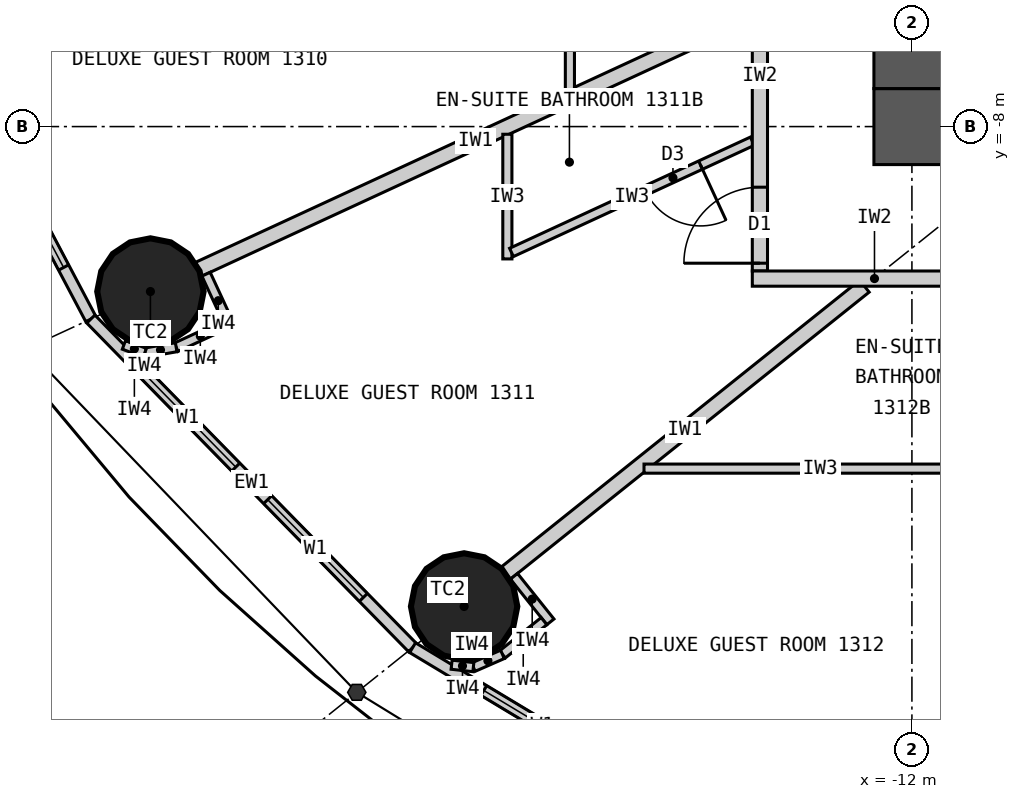
"""IFC4 building model, lengths in metres.
Left out: names, types, materials, properties, quantities, classifications, styles, units other than length and angle.
Written with IfcOpenShell. Run it as: python <this file> out.ifc"""

import sys

from ifc_helpers import new_model, si_unit, direction, frame, frame_2d, origin, origin_2d, place, context, subcontext, project, spatial, rectangle, circle, extrude, element, fill, save


model = new_model("IFC4")
c1 = context("Model", 3, precision=1e-05, world=origin(), true_north=direction((0.0, 1.0)))
c2 = subcontext(c1, "Body", "Model", "MODEL_VIEW")
j1 = project(units=[si_unit("LENGTHUNIT", "METRE"), si_unit("PLANEANGLEUNIT", "RADIAN")], contexts=[c1])
p1 = place(None, origin())
s1 = spatial("IfcSite", under=j1, at=p1, CompositionType="ELEMENT")
p2 = place(p1, origin())
s2 = spatial("IfcBuilding", under=s1, at=p2, CompositionType="ELEMENT")
p3 = place(p2, frame((0.0, 0.0, 57.3)))
s3 = spatial("IfcBuildingStorey", under=s2, at=p3, CompositionType="ELEMENT", Elevation=57.3)
for number, where, z_axis, x_axis in (
    (1, (-22.019, -10.17, 0.0), (0.0, 0.0, 1.0), (1.0, 0.0, 0.0)),
    (2, (-17.892, -14.313, 0.0), (0.0, 0.0, 1.0), (1.0, 0.0, 0.0)),
):
    element("IfcColumn", number, at=place(p3, frame(where, z_axis=z_axis, x_axis=x_axis)), inside=s3, PredefinedType="COLUMN", context=c2, shape_type="SweptSolid", body=[
        extrude(circle(Radius=0.7, at=origin_2d()), origin(), (0.0, 0.0, 1.0), 3.3),
    ])
p4 = place(p3, frame((12.5, -8.0, 0.0), z_axis=(0.0, 0.0, 1.0), x_axis=(-1.0, 0.0, 0.0)))
e3 = element("IfcWall", 3, at=p4, inside=s3, PredefinedType="SHEAR", context=c2, shape_type="SweptSolid", body=[
    extrude(rectangle(XDim=25.0, YDim=1.0, at=frame_2d((12.5, 0.0))), origin(), (0.0, 0.0, 1.0), 3.3),
])
p5 = place(p4, frame((11.2, 0.0, 0.0)))
e4 = element("IfcOpeningElement", 4, at=p5, cuts=e3, PredefinedType="OPENING", context=c2, shape_type="SweptSolid", body=[
    extrude(rectangle(XDim=1.2, YDim=2.2, at=frame_2d((0.6, 1.1))), frame((0.0, 0.51, 0.0), z_axis=(0.0, -1.0, 0.0), x_axis=(1.0, 0.0, 0.0)), (0.0, 0.0, 1.0), 1.02),
])
p6 = place(p4, frame((18.8, 0.0, 0.0)))
e5 = element("IfcOpeningElement", 5, at=p6, cuts=e3, PredefinedType="OPENING", context=c2, shape_type="SweptSolid", body=[
    extrude(rectangle(XDim=0.9, YDim=2.2, at=frame_2d((0.45, 1.1))), frame((0.0, 0.51, 0.0), z_axis=(0.0, -1.0, 0.0), x_axis=(1.0, 0.0, 0.0)), (0.0, 0.0, 1.0), 1.02),
])
p7 = place(p3, frame((-12.0, 7.5, 0.0), z_axis=(0.0, 0.0, 1.0), x_axis=(0.0, -1.0, 0.0)))
e6 = element("IfcWall", 6, at=p7, inside=s3, PredefinedType="SHEAR", context=c2, shape_type="SweptSolid", body=[
    extrude(rectangle(XDim=15.0, YDim=1.0, at=frame_2d((7.5, 0.0))), origin(), (0.0, 0.0, 1.0), 3.3),
])
p8 = place(p7, frame((6.6, 0.0, 0.0)))
e7 = element("IfcOpeningElement", 7, at=p8, cuts=e6, PredefinedType="OPENING", context=c2, shape_type="SweptSolid", body=[
    extrude(rectangle(XDim=1.8, YDim=2.2, at=frame_2d((0.9, 1.1))), frame((0.0, 0.51, 0.0), z_axis=(0.0, -1.0, 0.0), x_axis=(1.0, 0.0, 0.0)), (0.0, 0.0, 1.0), 1.02),
])
p9 = place(p3, frame((-25.482, -5.462, 0.0), z_axis=(0.0, 0.0, 1.0), x_axis=(0.467296867008, -0.884100468321, 0.0)))
e8 = element("IfcWall", 8, at=p9, inside=s3, PredefinedType="ELEMENTEDWALL", context=c2, shape_type="SweptSolid", body=[
    extrude(rectangle(XDim=5.734, YDim=0.15, at=frame_2d((2.867, 0.0))), origin(), (0.0, 0.0, 1.0), 3.12),
])
p10 = place(p9, frame((0.767, 0.0, 0.9)))
e9 = element("IfcOpeningElement", 9, at=p10, cuts=e8, PredefinedType="OPENING", context=c2, shape_type="SweptSolid", body=[
    extrude(rectangle(XDim=1.8, YDim=1.9, at=frame_2d((0.9, 0.95))), frame((0.0, 0.085, 0.0), z_axis=(0.0, -1.0, 0.0), x_axis=(1.0, 0.0, 0.0)), (0.0, 0.0, 1.0), 0.17),
])
p11 = place(p9, frame((3.167, 0.0, 0.9)))
e10 = element("IfcOpeningElement", 10, at=p11, cuts=e8, PredefinedType="OPENING", context=c2, shape_type="SweptSolid", body=[
    extrude(rectangle(XDim=1.8, YDim=1.9, at=frame_2d((0.9, 0.95))), frame((0.0, 0.085, 0.0), z_axis=(0.0, -1.0, 0.0), x_axis=(1.0, 0.0, 0.0)), (0.0, 0.0, 1.0), 0.17),
])
p12 = place(p3, frame((-22.803, -10.532, 0.0), z_axis=(0.0, 0.0, 1.0), x_axis=(0.699602905915, -0.714531856557, 0.0)))
e11 = element("IfcWall", 11, at=p12, inside=s3, PredefinedType="ELEMENTEDWALL", context=c2, shape_type="SweptSolid", body=[
    extrude(rectangle(XDim=6.051, YDim=0.15, at=frame_2d((3.025, 0.0))), origin(), (0.0, 0.0, 1.0), 3.12),
])
p13 = place(p12, frame((0.926, 0.0, 0.9)))
e12 = element("IfcOpeningElement", 12, at=p13, cuts=e11, PredefinedType="OPENING", context=c2, shape_type="SweptSolid", body=[
    extrude(rectangle(XDim=1.8, YDim=1.9, at=frame_2d((0.9, 0.95))), frame((0.0, 0.085, 0.0), z_axis=(0.0, -1.0, 0.0), x_axis=(1.0, 0.0, 0.0)), (0.0, 0.0, 1.0), 0.17),
])
p14 = place(p12, frame((3.325, 0.0, 0.9)))
e13 = element("IfcOpeningElement", 13, at=p14, cuts=e11, PredefinedType="OPENING", context=c2, shape_type="SweptSolid", body=[
    extrude(rectangle(XDim=1.8, YDim=1.9, at=frame_2d((0.9, 0.95))), frame((0.0, 0.085, 0.0), z_axis=(0.0, -1.0, 0.0), x_axis=(1.0, 0.0, 0.0)), (0.0, 0.0, 1.0), 0.17),
])
p15 = place(p3, frame((-18.57, -14.856, 0.0), z_axis=(0.0, 0.0, 1.0), x_axis=(0.856983180864, -0.515344377787, 0.0)))
e14 = element("IfcWall", 14, at=p15, inside=s3, PredefinedType="ELEMENTEDWALL", context=c2, shape_type="SweptSolid", body=[
    extrude(rectangle(XDim=6.386, YDim=0.15, at=frame_2d((3.193, 0.0))), origin(), (0.0, 0.0, 1.0), 3.12),
])
p16 = place(p15, frame((1.093, 0.0, 0.9)))
e15 = element("IfcOpeningElement", 15, at=p16, cuts=e14, PredefinedType="OPENING", context=c2, shape_type="SweptSolid", body=[
    extrude(rectangle(XDim=1.8, YDim=1.9, at=frame_2d((0.9, 0.95))), frame((0.0, 0.085, 0.0), z_axis=(0.0, -1.0, 0.0), x_axis=(1.0, 0.0, 0.0)), (0.0, 0.0, 1.0), 0.17),
])
p17 = place(p15, frame((3.493, 0.0, 0.9)))
e16 = element("IfcOpeningElement", 16, at=p17, cuts=e14, PredefinedType="OPENING", context=c2, shape_type="SweptSolid", body=[
    extrude(rectangle(XDim=1.8, YDim=1.9, at=frame_2d((0.9, 0.95))), frame((0.0, 0.085, 0.0), z_axis=(0.0, -1.0, 0.0), x_axis=(1.0, 0.0, 0.0)), (0.0, 0.0, 1.0), 0.17),
])
p18 = place(p3, frame((-14.1, -6.512, 0.0), z_axis=(0.0, 0.0, 1.0), x_axis=(-0.907832871056, -0.419332181247, 0.0)))
e17 = element("IfcWall", 17, at=p18, inside=s3, PredefinedType="PARTITIONING", context=c2, shape_type="SweptSolid", body=[
    extrude(rectangle(XDim=8.023, YDim=0.2, at=frame_2d((4.011, 0.0))), origin(), (0.0, 0.0, 1.0), 2.32),
])
p19 = place(p3, frame((-12.625, -10.1, 0.0), z_axis=(0.0, 0.0, 1.0), x_axis=(-0.780892451574, -0.624665493744, 0.0)))
e18 = element("IfcWall", 18, at=p19, inside=s3, PredefinedType="PARTITIONING", context=c2, shape_type="SweptSolid", body=[
    extrude(rectangle(XDim=6.045, YDim=0.2, at=frame_2d((3.022, 0.0))), origin(), (0.0, 0.0, 1.0), 2.32),
])
p20 = place(p3, frame((-7.289, -10.1, 0.0), z_axis=(0.0, 0.0, 1.0), x_axis=(-0.585198353053, -0.810890182197, 0.0)))
e19 = element("IfcWall", 19, at=p20, inside=s3, PredefinedType="PARTITIONING", context=c2, shape_type="SweptSolid", body=[
    extrude(rectangle(XDim=8.36, YDim=0.2, at=frame_2d((4.18, 0.0))), origin(), (0.0, 0.0, 1.0), 2.32),
])
p21 = place(p3, frame((-16.5, -7.521, 0.0), z_axis=(0.0, 0.0, 1.0), x_axis=(0.0, 1.0, 0.0)))
e20 = element("IfcWall", 20, at=p21, inside=s3, PredefinedType="PARTITIONING", context=c2, shape_type="SweptSolid", body=[
    extrude(rectangle(XDim=2.749, YDim=0.12, at=frame_2d((1.374, 0.0))), origin(), (0.0, 0.0, 1.0), 3.12),
])
p22 = place(p3, frame((-17.323, -8.101, 0.0), z_axis=(0.0, 0.0, 1.0), x_axis=(0.0, -1.0, 0.0)))
e21 = element("IfcWall", 21, at=p22, inside=s3, PredefinedType="PARTITIONING", context=c2, shape_type="SweptSolid", body=[
    extrude(rectangle(XDim=1.64, YDim=0.12, at=frame_2d((0.82, 0.0))), origin(), (0.0, 0.0, 1.0), 3.12),
])
p23 = place(p3, frame((-14.1, -8.193, 0.0), z_axis=(0.0, 0.0, 1.0), x_axis=(-0.907836493557, -0.419324338628, 0.0)))
e22 = element("IfcWall", 22, at=p23, inside=s3, PredefinedType="PARTITIONING", context=c2, shape_type="SweptSolid", body=[
    extrude(rectangle(XDim=3.49, YDim=0.12, at=frame_2d((1.745, 0.0))), origin(), (0.0, 0.0, 1.0), 3.12),
])
p24 = place(p23, frame((0.75, 0.0, 0.0)))
e23 = element("IfcOpeningElement", 23, at=p24, cuts=e22, PredefinedType="OPENING", context=c2, shape_type="SweptSolid", body=[
    extrude(rectangle(XDim=0.8, YDim=2.1, at=frame_2d((0.4, 1.05))), frame((0.0, 0.07, 0.0), z_axis=(0.0, -1.0, 0.0), x_axis=(1.0, 0.0, 0.0)), (0.0, 0.0, 1.0), 0.14),
])
p25 = place(p3, frame((-15.525, -12.5, 0.0), z_axis=(0.0, 0.0, 1.0), x_axis=(1.0, 0.0, 0.0)))
e24 = element("IfcWall", 24, at=p25, inside=s3, PredefinedType="PARTITIONING", context=c2, shape_type="SweptSolid", body=[
    extrude(rectangle(XDim=4.64, YDim=0.12, at=frame_2d((2.32, 0.0))), origin(), (0.0, 0.0, 1.0), 3.12),
])
p26 = place(p3, frame((-14.0, -4.772, 0.0), z_axis=(0.0, 0.0, 1.0), x_axis=(0.0, -1.0, 0.0)))
e25 = element("IfcWall", 25, at=p26, inside=s3, PredefinedType="PARTITIONING", context=c2, shape_type="SweptSolid", body=[
    extrude(rectangle(XDim=5.127, YDim=0.2, at=frame_2d((2.564, 0.0))), origin(), (0.0, 0.0, 1.0), 3.12),
])
p27 = place(p26, frame((4.025, 0.0, 0.0)))
e26 = element("IfcOpeningElement", 26, at=p27, cuts=e25, PredefinedType="OPENING", context=c2, shape_type="SweptSolid", body=[
    extrude(rectangle(XDim=1.0, YDim=2.2, at=frame_2d((0.5, 1.1))), frame((0.0, 0.11, 0.0), z_axis=(0.0, -1.0, 0.0), x_axis=(1.0, 0.0, 0.0)), (0.0, 0.0, 1.0), 0.22),
])
p28 = place(p3, frame((-10.885, -10.0, 0.0), z_axis=(0.0, 0.0, 1.0), x_axis=(-1.0, 0.0, 0.0)))
e27 = element("IfcWall", 27, at=p28, inside=s3, PredefinedType="PARTITIONING", context=c2, shape_type="SweptSolid", body=[
    extrude(rectangle(XDim=3.215, YDim=0.2, at=frame_2d((1.607, 0.0))), origin(), (0.0, 0.0, 1.0), 3.12),
])
p29 = place(p3, frame((-21.287, -9.942, 0.0), z_axis=(0.0, 0.0, 1.0), x_axis=(0.419259891039, -0.907866258744, 0.0)))
e28 = element("IfcWall", 28, at=p29, inside=s3, PredefinedType="PARTITIONING", context=c2, shape_type="SweptSolid", body=[
    extrude(rectangle(XDim=0.768, YDim=0.12, at=frame_2d((0.384, 0.0))), origin(), (0.0, 0.0, 1.0), 3.12),
])
p30 = place(p3, frame((-21.045, -10.61, 0.0), z_axis=(0.0, 0.0, 1.0), x_axis=(-0.907877701396, -0.419235112208, 0.0)))
e29 = element("IfcWall", 29, at=p30, inside=s3, PredefinedType="PARTITIONING", context=c2, shape_type="SweptSolid", body=[
    extrude(rectangle(XDim=0.7, YDim=0.12, at=frame_2d((0.35, 0.0))), origin(), (0.0, 0.0, 1.0), 3.12),
])
p31 = place(p3, frame((-21.68, -10.903, 0.0), z_axis=(0.0, 0.0, 1.0), x_axis=(-0.985446622073, -0.169985161247, 0.0)))
e30 = element("IfcWall", 30, at=p31, inside=s3, PredefinedType="PARTITIONING", context=c2, shape_type="SweptSolid", body=[
    extrude(rectangle(XDim=0.418, YDim=0.12, at=frame_2d((0.209, 0.0))), origin(), (0.0, 0.0, 1.0), 3.12),
])
p32 = place(p3, frame((-22.092, -10.974, 0.0), z_axis=(0.0, 0.0, 1.0), x_axis=(-0.938428160676, 0.345474437912, 0.0)))
e31 = element("IfcWall", 31, at=p32, inside=s3, PredefinedType="PARTITIONING", context=c2, shape_type="SweptSolid", body=[
    extrude(rectangle(XDim=0.294, YDim=0.12, at=frame_2d((0.147, 0.0))), origin(), (0.0, 0.0, 1.0), 3.12),
])
p33 = place(p3, frame((-17.236, -13.917, 0.0), z_axis=(0.0, 0.0, 1.0), x_axis=(0.624695047554, -0.780868809443, 0.0)))
e32 = element("IfcWall", 32, at=p33, inside=s3, PredefinedType="PARTITIONING", context=c2, shape_type="SweptSolid", body=[
    extrude(rectangle(XDim=0.768, YDim=0.12, at=frame_2d((0.384, 0.0))), origin(), (0.0, 0.0, 1.0), 3.12),
])
p34 = place(p3, frame((-16.841, -14.507, 0.0), z_axis=(0.0, 0.0, 1.0), x_axis=(-0.780902834923, -0.62465251333, 0.0)))
e33 = element("IfcWall", 33, at=p34, inside=s3, PredefinedType="PARTITIONING", context=c2, shape_type="SweptSolid", body=[
    extrude(rectangle(XDim=0.7, YDim=0.12, at=frame_2d((0.35, 0.0))), origin(), (0.0, 0.0, 1.0), 3.12),
])
p35 = place(p3, frame((-17.387, -14.944, 0.0), z_axis=(0.0, 0.0, 1.0), x_axis=(-0.916036698064, -0.401094462441, 0.0)))
e34 = element("IfcWall", 34, at=p35, inside=s3, PredefinedType="PARTITIONING", context=c2, shape_type="SweptSolid", body=[
    extrude(rectangle(XDim=0.418, YDim=0.12, at=frame_2d((0.209, 0.0))), origin(), (0.0, 0.0, 1.0), 3.12),
])
p36 = place(p3, frame((-17.77, -15.112, 0.0), z_axis=(0.0, 0.0, 1.0), x_axis=(-0.993904401174, 0.110245368731, 0.0)))
e35 = element("IfcWall", 35, at=p36, inside=s3, PredefinedType="PARTITIONING", context=c2, shape_type="SweptSolid", body=[
    extrude(rectangle(XDim=0.288, YDim=0.12, at=frame_2d((0.144, 0.0))), origin(), (0.0, 0.0, 1.0), 3.12),
])
p37 = place(p11, origin())
e36 = element("IfcWindow", 36, at=p37, inside=s3, PartitioningType="SINGLE_PANEL", PredefinedType="WINDOW", context=c2, shape_type="SweptSolid", body=[
    extrude(rectangle(XDim=1.8, YDim=1.9, at=frame_2d((0.9, 0.95))), frame((0.0, 0.03, 0.0), z_axis=(0.0, -1.0, 0.0), x_axis=(1.0, 0.0, 0.0)), (0.0, 0.0, 1.0), 0.06),
])
fill(e10, e36)
p38 = place(p13, origin())
e37 = element("IfcWindow", 37, at=p38, inside=s3, PartitioningType="SINGLE_PANEL", PredefinedType="WINDOW", context=c2, shape_type="SweptSolid", body=[
    extrude(rectangle(XDim=1.8, YDim=1.9, at=frame_2d((0.9, 0.95))), frame((0.0, 0.03, 0.0), z_axis=(0.0, -1.0, 0.0), x_axis=(1.0, 0.0, 0.0)), (0.0, 0.0, 1.0), 0.06),
])
fill(e12, e37)
p39 = place(p14, origin())
e38 = element("IfcWindow", 38, at=p39, inside=s3, PartitioningType="SINGLE_PANEL", PredefinedType="WINDOW", context=c2, shape_type="SweptSolid", body=[
    extrude(rectangle(XDim=1.8, YDim=1.9, at=frame_2d((0.9, 0.95))), frame((0.0, 0.03, 0.0), z_axis=(0.0, -1.0, 0.0), x_axis=(1.0, 0.0, 0.0)), (0.0, 0.0, 1.0), 0.06),
])
fill(e13, e38)
p40 = place(p16, origin())
e39 = element("IfcWindow", 39, at=p40, inside=s3, PartitioningType="SINGLE_PANEL", PredefinedType="WINDOW", context=c2, shape_type="SweptSolid", body=[
    extrude(rectangle(XDim=1.8, YDim=1.9, at=frame_2d((0.9, 0.95))), frame((0.0, 0.03, 0.0), z_axis=(0.0, -1.0, 0.0), x_axis=(1.0, 0.0, 0.0)), (0.0, 0.0, 1.0), 0.06),
])
fill(e15, e39)
p41 = place(p24, origin())
e40 = element("IfcDoor", 40, at=p41, inside=s3, OperationType="SINGLE_SWING_LEFT", PredefinedType="DOOR", context=c2, shape_type="SweptSolid", body=[
    extrude(rectangle(XDim=0.8, YDim=2.1, at=frame_2d((0.4, 1.05))), frame((0.0, 0.025, 0.0), z_axis=(0.0, -1.0, 0.0), x_axis=(1.0, 0.0, 0.0)), (0.0, 0.0, 1.0), 0.05),
])
fill(e23, e40)
p42 = place(p27, origin())
e41 = element("IfcDoor", 41, at=p42, inside=s3, OperationType="SINGLE_SWING_RIGHT", PredefinedType="DOOR", context=c2, shape_type="SweptSolid", body=[
    extrude(rectangle(XDim=1.0, YDim=2.2, at=frame_2d((0.5, 1.1))), frame((0.0, 0.025, 0.0), z_axis=(0.0, -1.0, 0.0), x_axis=(1.0, 0.0, 0.0)), (0.0, 0.0, 1.0), 0.05),
])
fill(e26, e41)
save(model, sys.argv[1])
